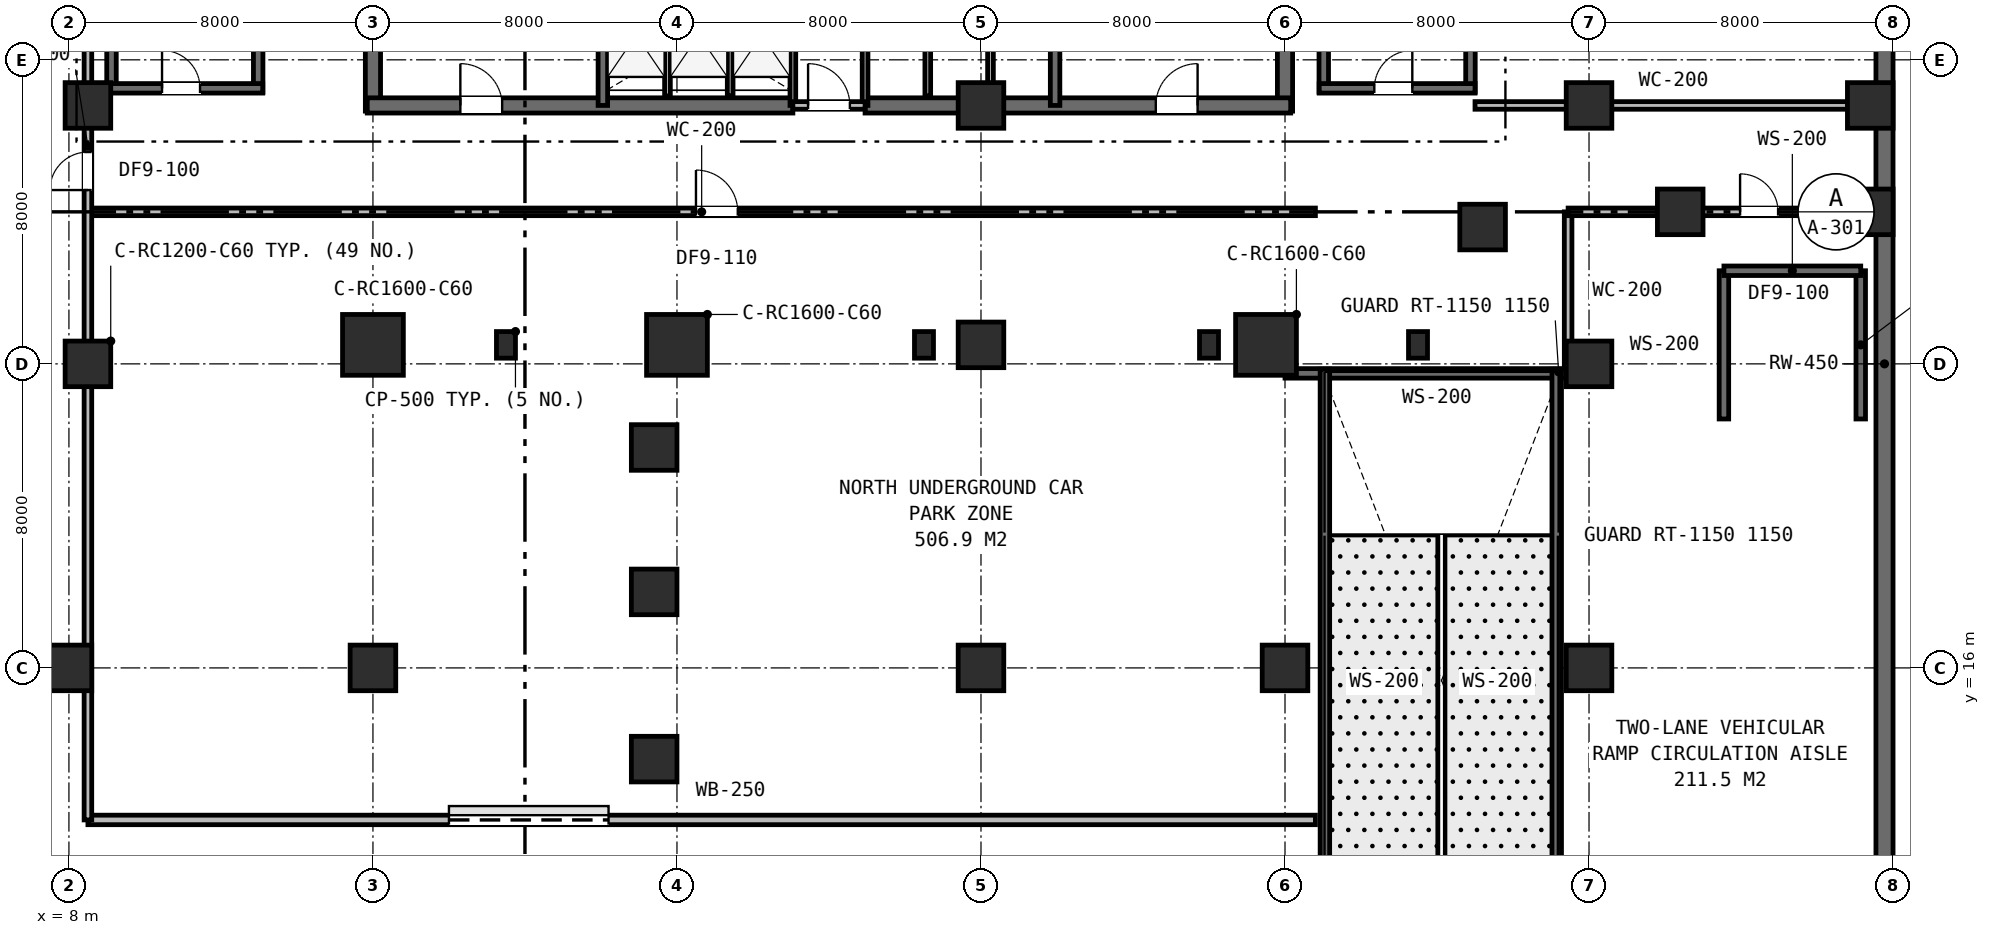
"""IFC4 building model, lengths in metres.
Left out: names, types, materials, properties, quantities, classifications, styles, units other than length and angle.
Written with IfcOpenShell. Run it as: python <this file> out.ifc"""

import sys

from ifc_helpers import new_model, si_unit, direction, frame, frame_2d, origin, origin_2d, place, context, subcontext, project, spatial, rectangle, extrude, element, fill, save


model = new_model("IFC4")
c1 = context("Model", 3, precision=1e-05, world=origin(), true_north=direction((0.0, 1.0)))
c2 = subcontext(c1, "Body", "Model", "MODEL_VIEW")
j1 = project(units=[si_unit("LENGTHUNIT", "METRE"), si_unit("PLANEANGLEUNIT", "RADIAN")], contexts=[c1])
p1 = place(None, origin())
s1 = spatial("IfcSite", under=j1, at=p1, CompositionType="ELEMENT")
p2 = place(p1, origin())
s2 = spatial("IfcBuilding", under=s1, at=p2, CompositionType="ELEMENT")
p3 = place(p2, frame((0.0, 0.0, -9.4)))
s3 = spatial("IfcBuildingStorey", under=s2, at=p3, CompositionType="ELEMENT", Elevation=-9.4)
p4 = place(p3, frame((55.775, 0.0, 0.0), z_axis=(0.0, 0.0, 1.0), x_axis=(0.0, 1.0, 0.0)))
e1 = element("IfcWall", 1, at=p4, inside=s3, PredefinedType="USERDEFINED", context=c2, shape_type="SweptSolid", body=[
    extrude(rectangle(XDim=48.0, YDim=0.45, at=frame_2d((24.0, 0.0))), origin(), (0.0, 0.0, 1.0), 3.8),
])
for number, where, z_axis, x_axis in (
    (2, (16.0, 30.65, 0.0), (0.0, 0.0, 1.0), (0.0, 1.0, 0.0)),
    (3, (40.0, 30.65, 0.0), (0.0, 0.0, 1.0), (0.0, 1.0, 0.0)),
):
    element("IfcWall", number, at=place(p3, frame(where, z_axis=z_axis, x_axis=x_axis)), inside=s3, PredefinedType="SHEAR", context=c2, shape_type="SweptSolid", body=[
        extrude(rectangle(XDim=12.3, YDim=0.4, at=frame_2d((6.15, 0.0))), origin(), (0.0, 0.0, 1.0), 3.8),
    ])
p5 = place(p3, frame((15.85, 30.8, 0.0), z_axis=(0.0, 0.0, 1.0), x_axis=(1.0, 0.0, 0.0)))
e4 = element("IfcWall", 4, at=p5, inside=s3, PredefinedType="SHEAR", context=c2, shape_type="SweptSolid", body=[
    extrude(rectangle(XDim=11.2, YDim=0.4, at=frame_2d((5.6, 0.0))), origin(), (0.0, 0.0, 1.0), 3.8),
])
p6 = place(p5, frame((2.45, 0.0, 0.0)))
e5 = element("IfcOpeningElement", 5, at=p6, cuts=e4, PredefinedType="OPENING", context=c2, shape_type="SweptSolid", body=[
    extrude(rectangle(XDim=1.1, YDim=2.15, at=frame_2d((0.55, 1.075))), frame((0.0, 0.21, 0.0), z_axis=(0.0, -1.0, 0.0), x_axis=(1.0, 0.0, 0.0)), (0.0, 0.0, 1.0), 0.42),
])
p7 = place(p3, frame((28.95, 30.8, 0.0), z_axis=(0.0, 0.0, 1.0), x_axis=(1.0, 0.0, 0.0)))
e6 = element("IfcWall", 6, at=p7, inside=s3, PredefinedType="SHEAR", context=c2, shape_type="SweptSolid", body=[
    extrude(rectangle(XDim=11.2, YDim=0.4, at=frame_2d((5.6, 0.0))), origin(), (0.0, 0.0, 1.0), 3.8),
])
p8 = place(p7, frame((7.65, 0.0, 0.0)))
e7 = element("IfcOpeningElement", 7, at=p8, cuts=e6, PredefinedType="OPENING", context=c2, shape_type="SweptSolid", body=[
    extrude(rectangle(XDim=1.1, YDim=2.15, at=frame_2d((0.55, 1.075))), frame((0.0, 0.21, 0.0), z_axis=(0.0, -1.0, 0.0), x_axis=(1.0, 0.0, 0.0)), (0.0, 0.0, 1.0), 0.42),
])
for number, where, z_axis, x_axis in (
    (8, (22.05, 30.8, 0.0), (0.0, 0.0, 1.0), (0.0, 1.0, 0.0)),
    (9, (33.95, 30.8, 0.0), (0.0, 0.0, 1.0), (0.0, 1.0, 0.0)),
):
    element("IfcWall", number, at=place(p3, frame(where, z_axis=z_axis, x_axis=x_axis)), inside=s3, PredefinedType="SHEAR", context=c2, shape_type="SweptSolid", body=[
        extrude(rectangle(XDim=6.45, YDim=0.25, at=frame_2d((3.225, 0.0))), origin(), (0.0, 0.0, 1.0), 3.8),
    ])
for number, where, z_axis, x_axis in (
    (10, (9.12, 31.15, 0.0), (0.0, 0.0, 1.0), (0.0, 1.0, 0.0)),
    (11, (12.98, 31.15, 0.0), (0.0, 0.0, 1.0), (0.0, 1.0, 0.0)),
):
    element("IfcWall", number, at=place(p3, frame(where, z_axis=z_axis, x_axis=x_axis)), inside=s3, PredefinedType="SHEAR", context=c2, shape_type="SweptSolid", body=[
        extrude(rectangle(XDim=8.8, YDim=0.25, at=frame_2d((4.4, 0.0))), origin(), (0.0, 0.0, 1.0), 3.8),
    ])
p9 = place(p3, frame((9.0, 31.25, 0.0), z_axis=(0.0, 0.0, 1.0), x_axis=(1.0, 0.0, 0.0)))
e12 = element("IfcWall", 12, at=p9, inside=s3, PredefinedType="SHEAR", context=c2, shape_type="SweptSolid", body=[
    extrude(rectangle(XDim=4.1, YDim=0.25, at=frame_2d((2.05, 0.0))), origin(), (0.0, 0.0, 1.0), 3.8),
])
p10 = place(p9, frame((1.45, 0.0, 0.0)))
e13 = element("IfcOpeningElement", 13, at=p10, cuts=e12, PredefinedType="OPENING", context=c2, shape_type="SweptSolid", body=[
    extrude(rectangle(XDim=1.0, YDim=2.15, at=frame_2d((0.5, 1.075))), frame((0.0, 0.135, 0.0), z_axis=(0.0, -1.0, 0.0), x_axis=(1.0, 0.0, 0.0)), (0.0, 0.0, 1.0), 0.27),
])
for number, where, z_axis, x_axis in (
    (14, (41.02, 31.15, 0.0), (0.0, 0.0, 1.0), (0.0, 1.0, 0.0)),
    (15, (44.88, 31.15, 0.0), (0.0, 0.0, 1.0), (0.0, 1.0, 0.0)),
):
    element("IfcWall", number, at=place(p3, frame(where, z_axis=z_axis, x_axis=x_axis)), inside=s3, PredefinedType="SHEAR", context=c2, shape_type="SweptSolid", body=[
        extrude(rectangle(XDim=8.8, YDim=0.25, at=frame_2d((4.4, 0.0))), origin(), (0.0, 0.0, 1.0), 3.8),
    ])
p11 = place(p3, frame((40.9, 31.25, 0.0), z_axis=(0.0, 0.0, 1.0), x_axis=(1.0, 0.0, 0.0)))
e16 = element("IfcWall", 16, at=p11, inside=s3, PredefinedType="SHEAR", context=c2, shape_type="SweptSolid", body=[
    extrude(rectangle(XDim=4.1, YDim=0.25, at=frame_2d((2.05, 0.0))), origin(), (0.0, 0.0, 1.0), 3.8),
])
p12 = place(p11, frame((1.45, 0.0, 0.0)))
e17 = element("IfcOpeningElement", 17, at=p12, cuts=e16, PredefinedType="OPENING", context=c2, shape_type="SweptSolid", body=[
    extrude(rectangle(XDim=1.0, YDim=2.15, at=frame_2d((0.5, 1.075))), frame((0.0, 0.135, 0.0), z_axis=(0.0, -1.0, 0.0), x_axis=(1.0, 0.0, 0.0)), (0.0, 0.0, 1.0), 0.27),
])
p13 = place(p3, frame((8.5, 24.0, 0.0), z_axis=(0.0, 0.0, 1.0), x_axis=(1.0, 0.0, 0.0)))
e18 = element("IfcColumn", 18, at=p13, inside=s3, PredefinedType="COLUMN", context=c2, shape_type="SweptSolid", body=[
    extrude(rectangle(XDim=1.2, YDim=1.2, at=origin_2d()), origin(), (0.0, 0.0, 1.0), 3.8),
])
for number, where, z_axis, x_axis in (
    (19, (16.0, 24.5, 0.0), (0.0, 0.0, 1.0), (1.0, 0.0, 0.0)),
    (20, (24.0, 24.5, 0.0), (0.0, 0.0, 1.0), (1.0, 0.0, 0.0)),
):
    element("IfcColumn", number, at=place(p3, frame(where, z_axis=z_axis, x_axis=x_axis)), inside=s3, PredefinedType="COLUMN", context=c2, shape_type="SweptSolid", body=[
        extrude(rectangle(XDim=1.6, YDim=1.6, at=origin_2d()), origin(), (0.0, 0.0, 1.0), 3.8),
    ])
p14 = place(p3, frame((32.0, 24.5, 0.0), z_axis=(0.0, 0.0, 1.0), x_axis=(1.0, 0.0, 0.0)))
e21 = element("IfcColumn", 21, at=p14, inside=s3, PredefinedType="COLUMN", context=c2, shape_type="SweptSolid", body=[
    extrude(rectangle(XDim=1.2, YDim=1.2, at=origin_2d()), origin(), (0.0, 0.0, 1.0), 3.8),
])
p15 = place(p3, frame((39.5, 24.5, 0.0), z_axis=(0.0, 0.0, 1.0), x_axis=(1.0, 0.0, 0.0)))
e22 = element("IfcColumn", 22, at=p15, inside=s3, PredefinedType="COLUMN", context=c2, shape_type="SweptSolid", body=[
    extrude(rectangle(XDim=1.6, YDim=1.6, at=origin_2d()), origin(), (0.0, 0.0, 1.0), 3.8),
])
for number, where, z_axis, x_axis in (
    (23, (8.5, 30.8, 0.0), (0.0, 0.0, 1.0), (1.0, 0.0, 0.0)),
    (24, (45.2, 27.6, 0.0), (0.0, 0.0, 1.0), (1.0, 0.0, 0.0)),
    (25, (50.4, 28.0, 0.0), (0.0, 0.0, 1.0), (1.0, 0.0, 0.0)),
    (26, (55.4, 28.0, 0.0), (0.0, 0.0, 1.0), (1.0, 0.0, 0.0)),
    (27, (55.4, 30.8, 0.0), (0.0, 0.0, 1.0), (1.0, 0.0, 0.0)),
    (28, (23.4, 13.6, 0.0), (0.0, 0.0, 1.0), (1.0, 0.0, 0.0)),
    (29, (23.4, 18.0, 0.0), (0.0, 0.0, 1.0), (1.0, 0.0, 0.0)),
    (30, (23.4, 21.8, 0.0), (0.0, 0.0, 1.0), (1.0, 0.0, 0.0)),
    (31, (32.0, 30.8, 0.0), (0.0, 0.0, 1.0), (1.0, 0.0, 0.0)),
    (32, (8.0, 16.0, 0.0), (0.0, 0.0, 1.0), (1.0, 0.0, 0.0)),
    (33, (16.0, 16.0, 0.0), (0.0, 0.0, 1.0), (1.0, 0.0, 0.0)),
    (34, (32.0, 16.0, 0.0), (0.0, 0.0, 1.0), (1.0, 0.0, 0.0)),
    (35, (40.0, 16.0, 0.0), (0.0, 0.0, 1.0), (1.0, 0.0, 0.0)),
    (36, (48.0, 16.0, 0.0), (0.0, 0.0, 1.0), (1.0, 0.0, 0.0)),
    (37, (48.0, 24.0, 0.0), (0.0, 0.0, 1.0), (1.0, 0.0, 0.0)),
    (38, (48.0, 30.8, 0.0), (0.0, 0.0, 1.0), (1.0, 0.0, 0.0)),
):
    element("IfcColumn", number, at=place(p3, frame(where, z_axis=z_axis, x_axis=x_axis)), inside=s3, PredefinedType="COLUMN", context=c2, shape_type="SweptSolid", body=[
        extrude(rectangle(XDim=1.2, YDim=1.2, at=origin_2d()), origin(), (0.0, 0.0, 1.0), 3.8),
    ])
p16 = place(p3, frame((8.5, 12.0, 0.0), z_axis=(0.0, 0.0, 1.0), x_axis=(1.0, 0.0, 0.0)))
e39 = element("IfcWall", 39, at=p16, inside=s3, PredefinedType="STANDARD", context=c2, shape_type="SweptSolid", body=[
    extrude(rectangle(XDim=32.3, YDim=0.25, at=frame_2d((16.15, 0.0))), origin(), (0.0, 0.0, 1.0), 3.15),
])
p17 = place(p16, frame((9.5, 0.0, 0.0)))
e40 = element("IfcOpeningElement", 40, at=p17, cuts=e39, PredefinedType="OPENING", context=c2, shape_type="SweptSolid", body=[
    extrude(rectangle(XDim=4.2, YDim=2.95, at=frame_2d((2.1, 1.475))), frame((0.0, 0.135, 0.0), z_axis=(0.0, -1.0, 0.0), x_axis=(1.0, 0.0, 0.0)), (0.0, 0.0, 1.0), 0.27),
])
for number, where, z_axis, x_axis in (
    (41, (27.05, 30.8, 0.0), (0.0, 0.0, 1.0), (0.0, 1.0, 0.0)),
    (42, (28.95, 30.8, 0.0), (0.0, 0.0, 1.0), (0.0, 1.0, 0.0)),
):
    element("IfcWall", number, at=place(p3, frame(where, z_axis=z_axis, x_axis=x_axis)), inside=s3, PredefinedType="PLUMBINGWALL", context=c2, shape_type="SweptSolid", body=[
        extrude(rectangle(XDim=3.45, YDim=0.15, at=frame_2d((1.725, 0.0))), origin(), (0.0, 0.0, 1.0), 3.49),
    ])
p18 = place(p3, frame((27.05, 30.8, 0.0), z_axis=(0.0, 0.0, 1.0), x_axis=(1.0, 0.0, 0.0)))
e43 = element("IfcWall", 43, at=p18, inside=s3, PredefinedType="PARTITIONING", context=c2, shape_type="SweptSolid", body=[
    extrude(rectangle(XDim=1.9, YDim=0.2, at=frame_2d((0.95, 0.0))), origin(), (0.0, 0.0, 1.0), 3.49),
])
p19 = place(p18, frame((0.4, 0.0, 0.0)))
e44 = element("IfcOpeningElement", 44, at=p19, cuts=e43, PredefinedType="OPENING", context=c2, shape_type="SweptSolid", body=[
    extrude(rectangle(XDim=1.1, YDim=2.15, at=frame_2d((0.55, 1.075))), frame((0.0, 0.11, 0.0), z_axis=(0.0, -1.0, 0.0), x_axis=(1.0, 0.0, 0.0)), (0.0, 0.0, 1.0), 0.22),
])
for number, where, z_axis, x_axis in (
    (45, (23.75, 31.05, 0.0), (0.0, 0.0, 1.0), (0.0, 1.0, 0.0)),
    (46, (25.4, 31.05, 0.0), (0.0, 0.0, 1.0), (0.0, 1.0, 0.0)),
    (47, (30.6, 31.05, 0.0), (0.0, 0.0, 1.0), (0.0, 1.0, 0.0)),
):
    element("IfcWall", number, at=place(p3, frame(where, z_axis=z_axis, x_axis=x_axis)), inside=s3, PredefinedType="PLUMBINGWALL", context=c2, shape_type="SweptSolid", body=[
        extrude(rectangle(XDim=3.1, YDim=0.15, at=frame_2d((1.55, 0.0))), origin(), (0.0, 0.0, 1.0), 3.49),
    ])
p20 = place(p3, frame((32.25, 31.05, 0.0), z_axis=(0.0, 0.0, 1.0), x_axis=(0.0, 1.0, 0.0)))
e48 = element("IfcWall", 48, at=p20, inside=s3, PredefinedType="PLUMBINGWALL", context=c2, shape_type="SweptSolid", body=[
    extrude(rectangle(XDim=3.1, YDim=0.15, at=frame_2d((1.55, 0.0))), origin(), (0.0, 0.0, 1.0), 2.88),
])
p21 = place(p3, frame((45.0, 30.8, 0.0), z_axis=(0.0, 0.0, 1.0), x_axis=(1.0, 0.0, 0.0)))
e49 = element("IfcWall", 49, at=p21, inside=s3, PredefinedType="PARTITIONING", context=c2, shape_type="SweptSolid", body=[
    extrude(rectangle(XDim=10.45, YDim=0.2, at=frame_2d((5.225, 0.0))), origin(), (0.0, 0.0, 1.0), 2.88),
])
p22 = place(p3, frame((8.5, 28.0, 0.0), z_axis=(0.0, 0.0, 1.0), x_axis=(1.0, 0.0, 0.0)))
e50 = element("IfcWall", 50, at=p22, inside=s3, PredefinedType="PARTITIONING", context=c2, shape_type="SweptSolid", body=[
    extrude(rectangle(XDim=32.3, YDim=0.2, at=frame_2d((16.15, 0.0))), origin(), (0.0, 0.0, 1.0), 2.88),
])
p23 = place(p22, frame((16.0, 0.0, 0.0)))
e51 = element("IfcOpeningElement", 51, at=p23, cuts=e50, PredefinedType="OPENING", context=c2, shape_type="SweptSolid", body=[
    extrude(rectangle(XDim=1.1, YDim=2.15, at=frame_2d((0.55, 1.075))), frame((0.0, 0.11, 0.0), z_axis=(0.0, -1.0, 0.0), x_axis=(1.0, 0.0, 0.0)), (0.0, 0.0, 1.0), 0.22),
])
p24 = place(p3, frame((8.5, 12.0, 0.0), z_axis=(0.0, 0.0, 1.0), x_axis=(0.0, 1.0, 0.0)))
e52 = element("IfcWall", 52, at=p24, inside=s3, PredefinedType="PARTITIONING", context=c2, shape_type="SweptSolid", body=[
    extrude(rectangle(XDim=35.45, YDim=0.2, at=frame_2d((17.725, 0.0))), origin(), (0.0, 0.0, 1.0), 2.63),
])
p25 = place(p24, frame((16.574, 0.0, 0.0)))
e53 = element("IfcOpeningElement", 53, at=p25, cuts=e52, PredefinedType="OPENING", context=c2, shape_type="SweptSolid", body=[
    extrude(rectangle(XDim=1.0, YDim=2.15, at=frame_2d((0.5, 1.075))), frame((0.0, 0.11, 0.0), z_axis=(0.0, -1.0, 0.0), x_axis=(1.0, 0.0, 0.0)), (0.0, 0.0, 1.0), 0.22),
])
p26 = place(p3, frame((47.45, 23.85, 0.0), z_axis=(0.0, 0.0, 1.0), x_axis=(0.0, 1.0, 0.0)))
e54 = element("IfcWall", 54, at=p26, inside=s3, PredefinedType="PARTITIONING", context=c2, shape_type="SweptSolid", body=[
    extrude(rectangle(XDim=4.15, YDim=0.2, at=frame_2d((2.075, 0.0))), origin(), (0.0, 0.0, 1.0), 2.88),
])
p27 = place(p3, frame((47.45, 28.0, 0.0), z_axis=(0.0, 0.0, 1.0), x_axis=(1.0, 0.0, 0.0)))
e55 = element("IfcWall", 55, at=p27, inside=s3, PredefinedType="PARTITIONING", context=c2, shape_type="SweptSolid", body=[
    extrude(rectangle(XDim=8.0, YDim=0.2, at=frame_2d((4.0, 0.0))), origin(), (0.0, 0.0, 1.0), 2.88),
])
p28 = place(p27, frame((4.525, 0.0, 0.0)))
e56 = element("IfcOpeningElement", 56, at=p28, cuts=e55, PredefinedType="OPENING", context=c2, shape_type="SweptSolid", body=[
    extrude(rectangle(XDim=1.0, YDim=2.15, at=frame_2d((0.5, 1.075))), frame((0.0, 0.11, 0.0), z_axis=(0.0, -1.0, 0.0), x_axis=(1.0, 0.0, 0.0)), (0.0, 0.0, 1.0), 0.22),
])
p29 = place(p3, frame((40.0, 23.75, 0.0), z_axis=(0.0, 0.0, 1.0), x_axis=(1.0, 0.0, 0.0)))
e57 = element("IfcWall", 57, at=p29, inside=s3, PredefinedType="STANDARD", context=c2, shape_type="SweptSolid", body=[
    extrude(rectangle(XDim=8.0, YDim=0.25, at=frame_2d((4.0, 0.0))), origin(), (0.0, 0.0, 1.0), 3.5),
])
for number, where, z_axis, x_axis in (
    (58, (47.15, 7.38, 0.0), (0.0, 0.0, 1.0), (0.0, 1.0, 0.0)),
    (59, (41.05, 7.38, 0.0), (0.0, 0.0, 1.0), (0.0, 1.0, 0.0)),
):
    element("IfcWall", number, at=place(p3, frame(where, z_axis=z_axis, x_axis=x_axis)), inside=s3, PredefinedType="STANDARD", context=c2, shape_type="SweptSolid", body=[
        extrude(rectangle(XDim=16.48, YDim=0.25, at=frame_2d((8.24, 0.0))), origin(), (0.0, 0.0, 1.0), 3.5),
    ])
for number, where, z_axis, x_axis in (
    (60, (51.55, 22.55, 0.0), (0.0, 0.0, 1.0), (0.0, 1.0, 0.0)),
    (61, (55.15, 22.55, 0.0), (0.0, 0.0, 1.0), (0.0, 1.0, 0.0)),
):
    element("IfcWall", number, at=place(p3, frame(where, z_axis=z_axis, x_axis=x_axis)), inside=s3, PredefinedType="STANDARD", context=c2, shape_type="SweptSolid", body=[
        extrude(rectangle(XDim=3.9, YDim=0.25, at=frame_2d((1.95, 0.0))), origin(), (0.0, 0.0, 1.0), 3.8),
    ])
p30 = place(p3, frame((51.55, 26.45, 0.0), z_axis=(0.0, 0.0, 1.0), x_axis=(1.0, 0.0, 0.0)))
e62 = element("IfcWall", 62, at=p30, inside=s3, PredefinedType="STANDARD", context=c2, shape_type="SweptSolid", body=[
    extrude(rectangle(XDim=3.6, YDim=0.25, at=frame_2d((1.8, 0.0))), origin(), (0.0, 0.0, 1.0), 3.8),
])
for number, where, z_axis, x_axis in (
    (63, (19.5, 24.5, 0.0), (0.0, 0.0, 1.0), (1.0, 0.0, 0.0)),
    (64, (30.5, 24.5, 0.0), (0.0, 0.0, 1.0), (1.0, 0.0, 0.0)),
    (65, (38.0, 24.5, 0.0), (0.0, 0.0, 1.0), (1.0, 0.0, 0.0)),
    (66, (43.5, 24.5, 0.0), (0.0, 0.0, 1.0), (1.0, 0.0, 0.0)),
):
    element("IfcColumn", number, at=place(p3, frame(where, z_axis=z_axis, x_axis=x_axis)), inside=s3, PredefinedType="PILASTER", context=c2, shape_type="SweptSolid", body=[
        extrude(rectangle(XDim=0.5, YDim=0.7, at=origin_2d()), origin(), (0.0, 0.0, 1.0), 3.5),
    ])
p31 = place(p17, origin())
e67 = element("IfcDoor", 67, at=p31, inside=s3, OperationType="ROLLINGUP", PredefinedType="GATE", context=c2, shape_type="SweptSolid", body=[
    extrude(rectangle(XDim=4.2, YDim=2.95, at=frame_2d((2.1, 1.475))), frame((0.0, 0.025, 0.0), z_axis=(0.0, -1.0, 0.0), x_axis=(1.0, 0.0, 0.0)), (0.0, 0.0, 1.0), 0.05),
])
fill(e40, e67)
p32 = place(p19, origin())
e68 = element("IfcDoor", 68, at=p32, inside=s3, OperationType="SINGLE_SWING_LEFT", PredefinedType="DOOR", context=c2, shape_type="SweptSolid", body=[
    extrude(rectangle(XDim=1.1, YDim=2.15, at=frame_2d((0.55, 1.075))), frame((0.0, 0.025, 0.0), z_axis=(0.0, -1.0, 0.0), x_axis=(1.0, 0.0, 0.0)), (0.0, 0.0, 1.0), 0.05),
])
fill(e44, e68)
p33 = place(p6, origin())
e69 = element("IfcDoor", 69, at=p33, inside=s3, OperationType="SINGLE_SWING_LEFT", PredefinedType="DOOR", context=c2, shape_type="SweptSolid", body=[
    extrude(rectangle(XDim=1.1, YDim=2.15, at=frame_2d((0.55, 1.075))), frame((0.0, 0.025, 0.0), z_axis=(0.0, -1.0, 0.0), x_axis=(1.0, 0.0, 0.0)), (0.0, 0.0, 1.0), 0.05),
])
fill(e5, e69)
p34 = place(p8, origin())
e70 = element("IfcDoor", 70, at=p34, inside=s3, OperationType="SINGLE_SWING_RIGHT", PredefinedType="DOOR", context=c2, shape_type="SweptSolid", body=[
    extrude(rectangle(XDim=1.1, YDim=2.15, at=frame_2d((0.55, 1.075))), frame((0.0, 0.025, 0.0), z_axis=(0.0, -1.0, 0.0), x_axis=(1.0, 0.0, 0.0)), (0.0, 0.0, 1.0), 0.05),
])
fill(e7, e70)
p35 = place(p10, origin())
e71 = element("IfcDoor", 71, at=p35, inside=s3, OperationType="SINGLE_SWING_LEFT", PredefinedType="DOOR", context=c2, shape_type="SweptSolid", body=[
    extrude(rectangle(XDim=1.0, YDim=2.15, at=frame_2d((0.5, 1.075))), frame((0.0, 0.025, 0.0), z_axis=(0.0, -1.0, 0.0), x_axis=(1.0, 0.0, 0.0)), (0.0, 0.0, 1.0), 0.05),
])
fill(e13, e71)
p36 = place(p12, origin())
e72 = element("IfcDoor", 72, at=p36, inside=s3, OperationType="SINGLE_SWING_RIGHT", PredefinedType="DOOR", context=c2, shape_type="SweptSolid", body=[
    extrude(rectangle(XDim=1.0, YDim=2.15, at=frame_2d((0.5, 1.075))), frame((0.0, 0.025, 0.0), z_axis=(0.0, -1.0, 0.0), x_axis=(1.0, 0.0, 0.0)), (0.0, 0.0, 1.0), 0.05),
])
fill(e17, e72)
p37 = place(p23, origin())
e73 = element("IfcDoor", 73, at=p37, inside=s3, OperationType="SINGLE_SWING_LEFT", PredefinedType="DOOR", context=c2, shape_type="SweptSolid", body=[
    extrude(rectangle(XDim=1.1, YDim=2.15, at=frame_2d((0.55, 1.075))), frame((0.0, 0.025, 0.0), z_axis=(0.0, -1.0, 0.0), x_axis=(1.0, 0.0, 0.0)), (0.0, 0.0, 1.0), 0.05),
])
fill(e51, e73)
p38 = place(p25, origin())
e74 = element("IfcDoor", 74, at=p38, inside=s3, OperationType="SINGLE_SWING_LEFT", PredefinedType="DOOR", context=c2, shape_type="SweptSolid", body=[
    extrude(rectangle(XDim=1.0, YDim=2.15, at=frame_2d((0.5, 1.075))), frame((0.0, 0.025, 0.0), z_axis=(0.0, -1.0, 0.0), x_axis=(1.0, 0.0, 0.0)), (0.0, 0.0, 1.0), 0.05),
])
fill(e53, e74)
p39 = place(p28, origin())
e75 = element("IfcDoor", 75, at=p39, inside=s3, OperationType="SINGLE_SWING_LEFT", PredefinedType="DOOR", context=c2, shape_type="SweptSolid", body=[
    extrude(rectangle(XDim=1.0, YDim=2.15, at=frame_2d((0.5, 1.075))), frame((0.0, 0.025, 0.0), z_axis=(0.0, -1.0, 0.0), x_axis=(1.0, 0.0, 0.0)), (0.0, 0.0, 1.0), 0.05),
])
fill(e56, e75)
save(model, sys.argv[1])
